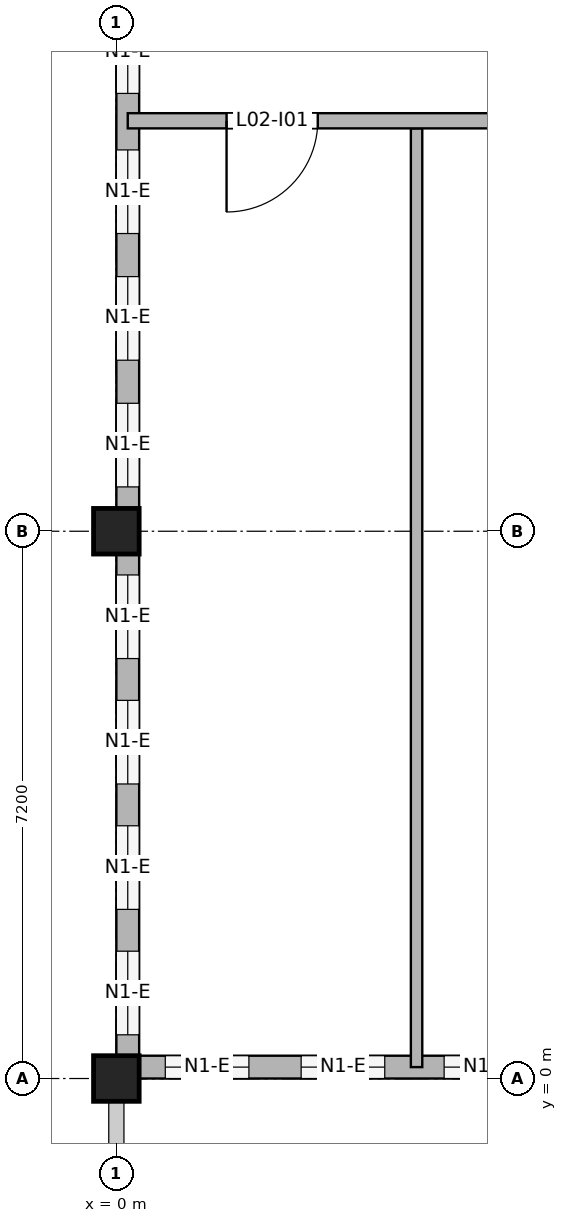
"""IFC4 building model, lengths in metres.
Left out: names, types, materials, properties, quantities, classifications, styles, units other than length and angle.
Written with IfcOpenShell. Run it as: python <this file> out.ifc"""

import sys

from ifc_helpers import new_model, si_unit, direction, frame, frame_2d, origin, origin_2d, place, context, subcontext, project, spatial, rectangle, extrude, element, fill, save


model = new_model("IFC4")
c1 = context("Model", 3, precision=1e-05, world=origin(), true_north=direction((0.0, 1.0)))
c2 = subcontext(c1, "Body", "Model", "MODEL_VIEW")
j1 = project(units=[si_unit("LENGTHUNIT", "METRE"), si_unit("PLANEANGLEUNIT", "RADIAN")], contexts=[c1])
p1 = place(None, origin())
s1 = spatial("IfcSite", under=j1, at=p1, CompositionType="ELEMENT")
p2 = place(p1, origin())
s2 = spatial("IfcBuilding", under=s1, at=p2, CompositionType="ELEMENT")
p3 = place(p2, frame((0.0, 0.0, 8.4)))
s3 = spatial("IfcBuildingStorey", under=s2, at=p3, CompositionType="ELEMENT", Elevation=8.4)
for number, where, z_axis, x_axis in (
    (1, (0.0, 0.0, 0.0), (0.0, 0.0, 1.0), (1.0, 0.0, 0.0)),
    (2, (0.0, 7.2, 0.0), (0.0, 0.0, 1.0), (1.0, 0.0, 0.0)),
):
    element("IfcColumn", number, at=place(p3, frame(where, z_axis=z_axis, x_axis=x_axis)), inside=s3, PredefinedType="COLUMN", context=c2, shape_type="SweptSolid", body=[
        extrude(rectangle(XDim=0.6, YDim=0.6, at=origin_2d()), origin(), (0.0, 0.0, 1.0), 3.95),
    ])
p4 = place(p3, frame((0.3, 0.15, 0.0), z_axis=(0.0, 0.0, 1.0), x_axis=(1.0, 0.0, 0.0)))
e3 = element("IfcWall", 3, at=p4, inside=s3, PredefinedType="SOLIDWALL", context=c2, shape_type="SweptSolid", body=[
    extrude(rectangle(XDim=5.4, YDim=0.3, at=frame_2d((2.7, 0.0))), origin(), (0.0, 0.0, 1.0), 3.15),
])
p5 = place(p4, frame((0.344, 0.0, 0.9)))
e4 = element("IfcOpeningElement", 4, at=p5, cuts=e3, PredefinedType="OPENING", context=c2, shape_type="SweptSolid", body=[
    extrude(rectangle(XDim=1.1, YDim=1.5, at=frame_2d((0.55, 0.75))), frame((0.0, 0.16, 0.0), z_axis=(0.0, -1.0, 0.0), x_axis=(1.0, 0.0, 0.0)), (0.0, 0.0, 1.0), 0.32),
])
p6 = place(p4, frame((2.131, 0.0, 0.9)))
e5 = element("IfcOpeningElement", 5, at=p6, cuts=e3, PredefinedType="OPENING", context=c2, shape_type="SweptSolid", body=[
    extrude(rectangle(XDim=1.1, YDim=1.5, at=frame_2d((0.55, 0.75))), frame((0.0, 0.16, 0.0), z_axis=(0.0, -1.0, 0.0), x_axis=(1.0, 0.0, 0.0)), (0.0, 0.0, 1.0), 0.32),
])
p7 = place(p4, frame((4.012, 0.0, 0.9)))
e6 = element("IfcOpeningElement", 6, at=p7, cuts=e3, PredefinedType="OPENING", context=c2, shape_type="SweptSolid", body=[
    extrude(rectangle(XDim=1.1, YDim=1.5, at=frame_2d((0.55, 0.75))), frame((0.0, 0.16, 0.0), z_axis=(0.0, -1.0, 0.0), x_axis=(1.0, 0.0, 0.0)), (0.0, 0.0, 1.0), 0.32),
])
p8 = place(p3, frame((0.15, 0.3, 0.0), z_axis=(0.0, 0.0, 1.0), x_axis=(0.0, 1.0, 0.0)))
e7 = element("IfcWall", 7, at=p8, inside=s3, PredefinedType="SOLIDWALL", context=c2, shape_type="SweptSolid", body=[
    extrude(rectangle(XDim=6.6, YDim=0.3, at=frame_2d((3.3, 0.0))), origin(), (0.0, 0.0, 1.0), 3.05),
])
p9 = place(p8, frame((0.275, 0.0, 0.9)))
e8 = element("IfcOpeningElement", 8, at=p9, cuts=e7, PredefinedType="OPENING", context=c2, shape_type="SweptSolid", body=[
    extrude(rectangle(XDim=1.1, YDim=1.5, at=frame_2d((0.55, 0.75))), frame((0.0, 0.16, 0.0), z_axis=(0.0, -1.0, 0.0), x_axis=(1.0, 0.0, 0.0)), (0.0, 0.0, 1.0), 0.32),
])
p10 = place(p8, frame((1.925, 0.0, 0.9)))
e9 = element("IfcOpeningElement", 9, at=p10, cuts=e7, PredefinedType="OPENING", context=c2, shape_type="SweptSolid", body=[
    extrude(rectangle(XDim=1.1, YDim=1.5, at=frame_2d((0.55, 0.75))), frame((0.0, 0.16, 0.0), z_axis=(0.0, -1.0, 0.0), x_axis=(1.0, 0.0, 0.0)), (0.0, 0.0, 1.0), 0.32),
])
p11 = place(p8, frame((3.575, 0.0, 0.9)))
e10 = element("IfcOpeningElement", 10, at=p11, cuts=e7, PredefinedType="OPENING", context=c2, shape_type="SweptSolid", body=[
    extrude(rectangle(XDim=1.1, YDim=1.5, at=frame_2d((0.55, 0.75))), frame((0.0, 0.16, 0.0), z_axis=(0.0, -1.0, 0.0), x_axis=(1.0, 0.0, 0.0)), (0.0, 0.0, 1.0), 0.32),
])
p12 = place(p8, frame((5.225, 0.0, 0.9)))
e11 = element("IfcOpeningElement", 11, at=p12, cuts=e7, PredefinedType="OPENING", context=c2, shape_type="SweptSolid", body=[
    extrude(rectangle(XDim=1.1, YDim=1.5, at=frame_2d((0.55, 0.75))), frame((0.0, 0.16, 0.0), z_axis=(0.0, -1.0, 0.0), x_axis=(1.0, 0.0, 0.0)), (0.0, 0.0, 1.0), 0.32),
])
p13 = place(p3, frame((0.15, 7.5, 0.0), z_axis=(0.0, 0.0, 1.0), x_axis=(0.0, 1.0, 0.0)))
e12 = element("IfcWall", 12, at=p13, inside=s3, PredefinedType="SOLIDWALL", context=c2, shape_type="SweptSolid", body=[
    extrude(rectangle(XDim=6.9, YDim=0.3, at=frame_2d((3.45, 0.0))), origin(), (0.0, 0.0, 1.0), 3.05),
])
p14 = place(p13, frame((0.283, 0.0, 0.9)))
e13 = element("IfcOpeningElement", 13, at=p14, cuts=e12, PredefinedType="OPENING", context=c2, shape_type="SweptSolid", body=[
    extrude(rectangle(XDim=1.1, YDim=1.5, at=frame_2d((0.55, 0.75))), frame((0.0, 0.16, 0.0), z_axis=(0.0, -1.0, 0.0), x_axis=(1.0, 0.0, 0.0)), (0.0, 0.0, 1.0), 0.32),
])
p15 = place(p13, frame((1.95, 0.0, 0.9)))
e14 = element("IfcOpeningElement", 14, at=p15, cuts=e12, PredefinedType="OPENING", context=c2, shape_type="SweptSolid", body=[
    extrude(rectangle(XDim=1.1, YDim=1.5, at=frame_2d((0.55, 0.75))), frame((0.0, 0.16, 0.0), z_axis=(0.0, -1.0, 0.0), x_axis=(1.0, 0.0, 0.0)), (0.0, 0.0, 1.0), 0.32),
])
p16 = place(p13, frame((3.617, 0.0, 0.9)))
e15 = element("IfcOpeningElement", 15, at=p16, cuts=e12, PredefinedType="OPENING", context=c2, shape_type="SweptSolid", body=[
    extrude(rectangle(XDim=1.1, YDim=1.5, at=frame_2d((0.55, 0.75))), frame((0.0, 0.16, 0.0), z_axis=(0.0, -1.0, 0.0), x_axis=(1.0, 0.0, 0.0)), (0.0, 0.0, 1.0), 0.32),
])
p17 = place(p13, frame((5.46, 0.0, 0.9)))
e16 = element("IfcOpeningElement", 16, at=p17, cuts=e12, PredefinedType="OPENING", context=c2, shape_type="SweptSolid", body=[
    extrude(rectangle(XDim=1.1, YDim=1.5, at=frame_2d((0.55, 0.75))), frame((0.0, 0.16, 0.0), z_axis=(0.0, -1.0, 0.0), x_axis=(1.0, 0.0, 0.0)), (0.0, 0.0, 1.0), 0.32),
])
p18 = place(p3, frame((3.95, 0.15, 0.0), z_axis=(0.0, 0.0, 1.0), x_axis=(0.0, 1.0, 0.0)))
e17 = element("IfcWall", 17, at=p18, inside=s3, PredefinedType="PARTITIONING", context=c2, shape_type="SweptSolid", body=[
    extrude(rectangle(XDim=12.35, YDim=0.15, at=frame_2d((6.175, 0.0))), origin(), (0.0, 0.0, 1.0), 3.15),
])
p19 = place(p3, frame((0.15, 12.6, 0.0), z_axis=(0.0, 0.0, 1.0), x_axis=(1.0, 0.0, 0.0)))
e18 = element("IfcWall", 18, at=p19, inside=s3, PredefinedType="PARTITIONING", context=c2, shape_type="SweptSolid", body=[
    extrude(rectangle(XDim=9.53, YDim=0.2, at=frame_2d((4.765, 0.0))), origin(), (0.0, 0.0, 1.0), 3.05),
])
p20 = place(p19, frame((1.3, 0.0, 0.0)))
e19 = element("IfcOpeningElement", 19, at=p20, cuts=e18, PredefinedType="OPENING", context=c2, shape_type="SweptSolid", body=[
    extrude(rectangle(XDim=1.2, YDim=2.1, at=frame_2d((0.6, 1.05))), frame((0.0, 0.11, 0.0), z_axis=(0.0, -1.0, 0.0), x_axis=(1.0, 0.0, 0.0)), (0.0, 0.0, 1.0), 0.22),
])
p21 = place(p19, frame((4.85, 0.0, 0.0)))
e20 = element("IfcOpeningElement", 20, at=p21, cuts=e18, PredefinedType="OPENING", context=c2, shape_type="SweptSolid", body=[
    extrude(rectangle(XDim=1.2, YDim=2.1, at=frame_2d((0.6, 1.05))), frame((0.0, 0.11, 0.0), z_axis=(0.0, -1.0, 0.0), x_axis=(1.0, 0.0, 0.0)), (0.0, 0.0, 1.0), 0.22),
])
p22 = place(p19, frame((7.815, 0.0, 0.0)))
e21 = element("IfcOpeningElement", 21, at=p22, cuts=e18, PredefinedType="OPENING", context=c2, shape_type="SweptSolid", body=[
    extrude(rectangle(XDim=1.0, YDim=2.1, at=frame_2d((0.5, 1.05))), frame((0.0, 0.11, 0.0), z_axis=(0.0, -1.0, 0.0), x_axis=(1.0, 0.0, 0.0)), (0.0, 0.0, 1.0), 0.22),
])
p23 = place(p5, origin())
e22 = element("IfcWindow", 22, at=p23, inside=s3, PartitioningType="SINGLE_PANEL", PredefinedType="WINDOW", context=c2, shape_type="SweptSolid", body=[
    extrude(rectangle(XDim=1.1, YDim=1.5, at=frame_2d((0.55, 0.75))), frame((0.0, 0.03, 0.0), z_axis=(0.0, -1.0, 0.0), x_axis=(1.0, 0.0, 0.0)), (0.0, 0.0, 1.0), 0.06),
])
fill(e4, e22)
p24 = place(p6, origin())
e23 = element("IfcWindow", 23, at=p24, inside=s3, PartitioningType="SINGLE_PANEL", PredefinedType="WINDOW", context=c2, shape_type="SweptSolid", body=[
    extrude(rectangle(XDim=1.1, YDim=1.5, at=frame_2d((0.55, 0.75))), frame((0.0, 0.03, 0.0), z_axis=(0.0, -1.0, 0.0), x_axis=(1.0, 0.0, 0.0)), (0.0, 0.0, 1.0), 0.06),
])
fill(e5, e23)
p25 = place(p7, origin())
e24 = element("IfcWindow", 24, at=p25, inside=s3, PartitioningType="SINGLE_PANEL", PredefinedType="WINDOW", context=c2, shape_type="SweptSolid", body=[
    extrude(rectangle(XDim=1.1, YDim=1.5, at=frame_2d((0.55, 0.75))), frame((0.0, 0.03, 0.0), z_axis=(0.0, -1.0, 0.0), x_axis=(1.0, 0.0, 0.0)), (0.0, 0.0, 1.0), 0.06),
])
fill(e6, e24)
p26 = place(p9, origin())
e25 = element("IfcWindow", 25, at=p26, inside=s3, PartitioningType="SINGLE_PANEL", PredefinedType="WINDOW", context=c2, shape_type="SweptSolid", body=[
    extrude(rectangle(XDim=1.1, YDim=1.5, at=frame_2d((0.55, 0.75))), frame((0.0, 0.03, 0.0), z_axis=(0.0, -1.0, 0.0), x_axis=(1.0, 0.0, 0.0)), (0.0, 0.0, 1.0), 0.06),
])
fill(e8, e25)
p27 = place(p10, origin())
e26 = element("IfcWindow", 26, at=p27, inside=s3, PartitioningType="SINGLE_PANEL", PredefinedType="WINDOW", context=c2, shape_type="SweptSolid", body=[
    extrude(rectangle(XDim=1.1, YDim=1.5, at=frame_2d((0.55, 0.75))), frame((0.0, 0.03, 0.0), z_axis=(0.0, -1.0, 0.0), x_axis=(1.0, 0.0, 0.0)), (0.0, 0.0, 1.0), 0.06),
])
fill(e9, e26)
p28 = place(p11, origin())
e27 = element("IfcWindow", 27, at=p28, inside=s3, PartitioningType="SINGLE_PANEL", PredefinedType="WINDOW", context=c2, shape_type="SweptSolid", body=[
    extrude(rectangle(XDim=1.1, YDim=1.5, at=frame_2d((0.55, 0.75))), frame((0.0, 0.03, 0.0), z_axis=(0.0, -1.0, 0.0), x_axis=(1.0, 0.0, 0.0)), (0.0, 0.0, 1.0), 0.06),
])
fill(e10, e27)
p29 = place(p12, origin())
e28 = element("IfcWindow", 28, at=p29, inside=s3, PartitioningType="SINGLE_PANEL", PredefinedType="WINDOW", context=c2, shape_type="SweptSolid", body=[
    extrude(rectangle(XDim=1.1, YDim=1.5, at=frame_2d((0.55, 0.75))), frame((0.0, 0.03, 0.0), z_axis=(0.0, -1.0, 0.0), x_axis=(1.0, 0.0, 0.0)), (0.0, 0.0, 1.0), 0.06),
])
fill(e11, e28)
p30 = place(p14, origin())
e29 = element("IfcWindow", 29, at=p30, inside=s3, PartitioningType="SINGLE_PANEL", PredefinedType="WINDOW", context=c2, shape_type="SweptSolid", body=[
    extrude(rectangle(XDim=1.1, YDim=1.5, at=frame_2d((0.55, 0.75))), frame((0.0, 0.03, 0.0), z_axis=(0.0, -1.0, 0.0), x_axis=(1.0, 0.0, 0.0)), (0.0, 0.0, 1.0), 0.06),
])
fill(e13, e29)
p31 = place(p15, origin())
e30 = element("IfcWindow", 30, at=p31, inside=s3, PartitioningType="SINGLE_PANEL", PredefinedType="WINDOW", context=c2, shape_type="SweptSolid", body=[
    extrude(rectangle(XDim=1.1, YDim=1.5, at=frame_2d((0.55, 0.75))), frame((0.0, 0.03, 0.0), z_axis=(0.0, -1.0, 0.0), x_axis=(1.0, 0.0, 0.0)), (0.0, 0.0, 1.0), 0.06),
])
fill(e14, e30)
p32 = place(p16, origin())
e31 = element("IfcWindow", 31, at=p32, inside=s3, PartitioningType="SINGLE_PANEL", PredefinedType="WINDOW", context=c2, shape_type="SweptSolid", body=[
    extrude(rectangle(XDim=1.1, YDim=1.5, at=frame_2d((0.55, 0.75))), frame((0.0, 0.03, 0.0), z_axis=(0.0, -1.0, 0.0), x_axis=(1.0, 0.0, 0.0)), (0.0, 0.0, 1.0), 0.06),
])
fill(e15, e31)
p33 = place(p17, origin())
e32 = element("IfcWindow", 32, at=p33, inside=s3, PartitioningType="SINGLE_PANEL", PredefinedType="WINDOW", context=c2, shape_type="SweptSolid", body=[
    extrude(rectangle(XDim=1.1, YDim=1.5, at=frame_2d((0.55, 0.75))), frame((0.0, 0.03, 0.0), z_axis=(0.0, -1.0, 0.0), x_axis=(1.0, 0.0, 0.0)), (0.0, 0.0, 1.0), 0.06),
])
fill(e16, e32)
p34 = place(p20, frame((1.2, 0.0, 0.0), z_axis=(0.0, 0.0, 1.0), x_axis=(-1.0, 0.0, 0.0)))
e33 = element("IfcDoor", 33, at=p34, inside=s3, OperationType="SINGLE_SWING_RIGHT", PredefinedType="DOOR", context=c2, shape_type="SweptSolid", body=[
    extrude(rectangle(XDim=1.2, YDim=2.1, at=frame_2d((0.6, 1.05))), frame((0.0, 0.025, 0.0), z_axis=(0.0, -1.0, 0.0), x_axis=(1.0, 0.0, 0.0)), (0.0, 0.0, 1.0), 0.05),
])
fill(e19, e33)
save(model, sys.argv[1])
